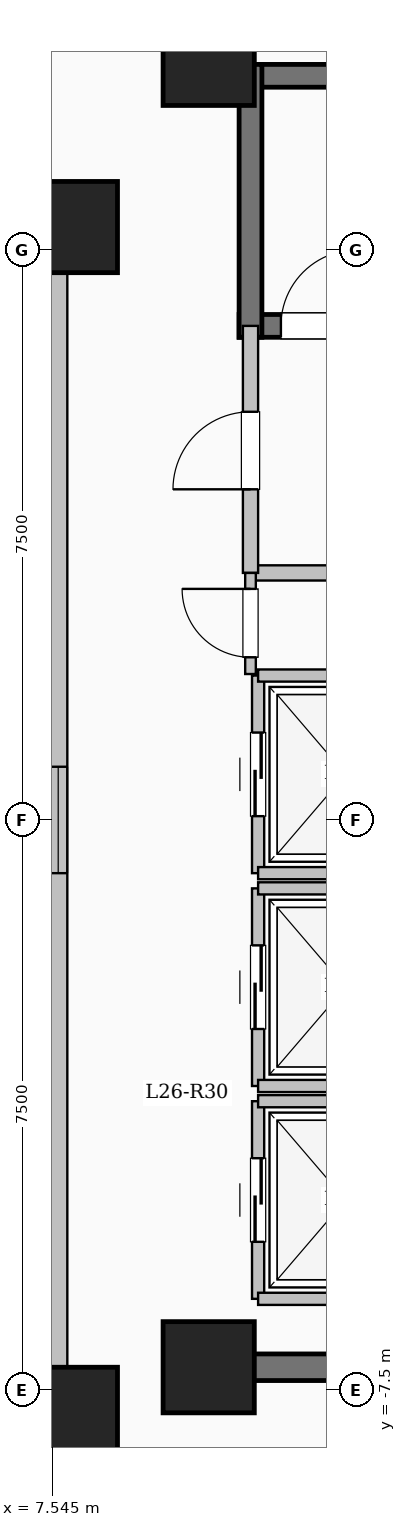
"""IFC4 building model, lengths in metres.
Left out: names, types, materials, properties, quantities, classifications, styles, units other than length and angle.
Written with IfcOpenShell. Run it as: python <this file> out.ifc"""

import sys

from ifc_helpers import new_model, si_unit, direction, frame, frame_2d, origin, origin_2d, place, context, subcontext, project, spatial, rectangle, extrude, element, fill, save


model = new_model("IFC4")
c1 = context("Model", 3, precision=1e-05, world=origin(), true_north=direction((0.0, 1.0)))
c2 = subcontext(c1, "Body", "Model", "MODEL_VIEW")
j1 = project(units=[si_unit("LENGTHUNIT", "METRE"), si_unit("PLANEANGLEUNIT", "RADIAN")], contexts=[c1])
p1 = place(None, origin())
s1 = spatial("IfcSite", under=j1, at=p1, CompositionType="ELEMENT")
p2 = place(p1, origin())
s2 = spatial("IfcBuilding", under=s1, at=p2, CompositionType="ELEMENT")
p3 = place(p2, frame((0.0, 0.0, 98.4)))
s3 = spatial("IfcBuildingStorey", under=s2, at=p3, CompositionType="ELEMENT", Elevation=98.4)
for number, where, z_axis, x_axis in (
    (1, (7.8, -7.8, 0.0), (0.0, 0.0, 1.0), (1.0, 0.0, 0.0)),
    (2, (7.8, 7.8, 0.0), (0.0, 0.0, 1.0), (1.0, 0.0, 0.0)),
    (3, (9.6, -7.2, 0.0), (0.0, 0.0, 1.0), (1.0, 0.0, 0.0)),
    (4, (9.6, 10.0, 0.0), (0.0, 0.0, 1.0), (1.0, 0.0, 0.0)),
):
    element("IfcColumn", number, at=place(p3, frame(where, z_axis=z_axis, x_axis=x_axis)), inside=s3, PredefinedType="COLUMN", context=c2, shape_type="SweptSolid", body=[
        extrude(rectangle(XDim=1.2, YDim=1.2, at=origin_2d()), origin(), (0.0, 0.0, 1.0), 3.35),
    ])
p4 = place(p3, frame((-7.62, -7.62, 0.0), z_axis=(0.0, 0.0, 1.0), x_axis=(1.0, 0.0, 0.0)))
e5 = element("IfcWall", 5, at=p4, inside=s3, PredefinedType="SOLIDWALL", context=c2, shape_type="SweptSolid", body=[
    extrude(rectangle(XDim=15.24, YDim=0.24, at=frame_2d((7.62, 0.0))), origin(), (0.0, 0.0, 1.0), 3.1),
])
p5 = place(p4, frame((6.92, 0.0, 0.95)))
e6 = element("IfcOpeningElement", 6, at=p5, cuts=e5, PredefinedType="OPENING", context=c2, shape_type="SweptSolid", body=[
    extrude(rectangle(XDim=1.4, YDim=1.5, at=frame_2d((0.7, 0.75))), frame((0.0, 0.13, 0.0), z_axis=(0.0, -1.0, 0.0), x_axis=(1.0, 0.0, 0.0)), (0.0, 0.0, 1.0), 0.26),
])
p6 = place(p3, frame((7.62, -7.62, 0.0), z_axis=(0.0, 0.0, 1.0), x_axis=(0.0, 1.0, 0.0)))
e7 = element("IfcWall", 7, at=p6, inside=s3, PredefinedType="SOLIDWALL", context=c2, shape_type="SweptSolid", body=[
    extrude(rectangle(XDim=15.24, YDim=0.24, at=frame_2d((7.62, 0.0))), origin(), (0.0, 0.0, 1.0), 3.1),
])
p7 = place(p6, frame((6.92, 0.0, 0.95)))
e8 = element("IfcOpeningElement", 8, at=p7, cuts=e7, PredefinedType="OPENING", context=c2, shape_type="SweptSolid", body=[
    extrude(rectangle(XDim=1.4, YDim=1.5, at=frame_2d((0.7, 0.75))), frame((0.0, 0.13, 0.0), z_axis=(0.0, -1.0, 0.0), x_axis=(1.0, 0.0, 0.0)), (0.0, 0.0, 1.0), 0.26),
])
p8 = place(p3, frame((7.62, 7.62, 0.0), z_axis=(0.0, 0.0, 1.0), x_axis=(-1.0, 0.0, 0.0)))
e9 = element("IfcWall", 9, at=p8, inside=s3, PredefinedType="SOLIDWALL", context=c2, shape_type="SweptSolid", body=[
    extrude(rectangle(XDim=15.24, YDim=0.24, at=frame_2d((7.62, 0.0))), origin(), (0.0, 0.0, 1.0), 3.1),
])
p9 = place(p8, frame((6.92, 0.0, 0.95)))
e10 = element("IfcOpeningElement", 10, at=p9, cuts=e9, PredefinedType="OPENING", context=c2, shape_type="SweptSolid", body=[
    extrude(rectangle(XDim=1.4, YDim=1.5, at=frame_2d((0.7, 0.75))), frame((0.0, 0.13, 0.0), z_axis=(0.0, -1.0, 0.0), x_axis=(1.0, 0.0, 0.0)), (0.0, 0.0, 1.0), 0.26),
])
p10 = place(p3, frame((10.0, 9.79, 0.0), z_axis=(0.0, 0.0, 1.0), x_axis=(1.0, 0.0, 0.0)))
e11 = element("IfcWall", 11, at=p10, inside=s3, PredefinedType="SHEAR", context=c2, shape_type="SweptSolid", body=[
    extrude(rectangle(XDim=8.0, YDim=0.3, at=frame_2d((4.0, 0.0))), origin(), (0.0, 0.0, 1.0), 3.35),
])
p11 = place(p3, frame((10.0, 6.5, 0.0), z_axis=(0.0, 0.0, 1.0), x_axis=(1.0, 0.0, 0.0)))
e12 = element("IfcWall", 12, at=p11, inside=s3, PredefinedType="SHEAR", context=c2, shape_type="SweptSolid", body=[
    extrude(rectangle(XDim=8.0, YDim=0.3, at=frame_2d((4.0, 0.0))), origin(), (0.0, 0.0, 1.0), 3.35),
])
p12 = place(p11, frame((0.55, 0.0, 0.0)))
e13 = element("IfcOpeningElement", 13, at=p12, cuts=e12, PredefinedType="OPENING", context=c2, shape_type="SweptSolid", body=[
    extrude(rectangle(XDim=1.0, YDim=2.15, at=frame_2d((0.5, 1.075))), frame((0.0, 0.16, 0.0), z_axis=(0.0, -1.0, 0.0), x_axis=(1.0, 0.0, 0.0)), (0.0, 0.0, 1.0), 0.32),
])
p13 = place(p3, frame((10.15, 6.35, 0.0), z_axis=(0.0, 0.0, 1.0), x_axis=(0.0, 1.0, 0.0)))
e14 = element("IfcWall", 14, at=p13, inside=s3, PredefinedType="SHEAR", context=c2, shape_type="SweptSolid", body=[
    extrude(rectangle(XDim=3.59, YDim=0.3, at=frame_2d((1.795, 0.0))), origin(), (0.0, 0.0, 1.0), 3.35),
])
p14 = place(p3, frame((10.15, 3.25, 0.0), z_axis=(0.0, 0.0, 1.0), x_axis=(1.0, 0.0, 0.0)))
e15 = element("IfcWall", 15, at=p14, inside=s3, PredefinedType="SOLIDWALL", context=c2, shape_type="SweptSolid", body=[
    extrude(rectangle(XDim=5.4, YDim=0.2, at=frame_2d((2.7, 0.0))), origin(), (0.0, 0.0, 1.0), 3.1),
])
p15 = place(p3, frame((10.15, 3.25, 0.0), z_axis=(0.0, 0.0, 1.0), x_axis=(0.0, 1.0, 0.0)))
e16 = element("IfcWall", 16, at=p15, inside=s3, PredefinedType="SOLIDWALL", context=c2, shape_type="SweptSolid", body=[
    extrude(rectangle(XDim=3.25, YDim=0.2, at=frame_2d((1.625, 0.0))), origin(), (0.0, 0.0, 1.0), 3.1),
])
p16 = place(p15, frame((1.1, 0.0, 0.0)))
e17 = element("IfcOpeningElement", 17, at=p16, cuts=e16, PredefinedType="OPENING", context=c2, shape_type="SweptSolid", body=[
    extrude(rectangle(XDim=1.02, YDim=2.15, at=frame_2d((0.51, 1.075))), frame((0.0, 0.11, 0.0), z_axis=(0.0, -1.0, 0.0), x_axis=(1.0, 0.0, 0.0)), (0.0, 0.0, 1.0), 0.22),
])
p17 = place(p3, frame((10.25, -6.3, 0.0), z_axis=(0.0, 0.0, 1.0), x_axis=(0.0, 1.0, 0.0)))
e18 = element("IfcWall", 18, at=p17, inside=s3, PredefinedType="SOLIDWALL", context=c2, shape_type="SweptSolid", body=[
    extrude(rectangle(XDim=2.6, YDim=0.16, at=frame_2d((1.3, 0.0))), origin(), (0.0, 0.0, 1.0), 3.1),
])
p18 = place(p17, frame((0.75, 0.0, 0.0)))
e19 = element("IfcOpeningElement", 19, at=p18, cuts=e18, PredefinedType="OPENING", context=c2, shape_type="SweptSolid", body=[
    extrude(rectangle(XDim=1.1, YDim=2.15, at=frame_2d((0.55, 1.075))), frame((0.0, 0.09, 0.0), z_axis=(0.0, -1.0, 0.0), x_axis=(1.0, 0.0, 0.0)), (0.0, 0.0, 1.0), 0.18),
])
for number, where, z_axis, x_axis in (
    (20, (10.25, -6.3, 0.0), (0.0, 0.0, 1.0), (1.0, 0.0, 0.0)),
    (21, (10.25, -3.7, 0.0), (0.0, 0.0, 1.0), (1.0, 0.0, 0.0)),
):
    element("IfcWall", number, at=place(p3, frame(where, z_axis=z_axis, x_axis=x_axis)), inside=s3, PredefinedType="SOLIDWALL", context=c2, shape_type="SweptSolid", body=[
        extrude(rectangle(XDim=2.3, YDim=0.16, at=frame_2d((1.15, 0.0))), origin(), (0.0, 0.0, 1.0), 3.1),
    ])
p19 = place(p3, frame((10.25, -3.5, 0.0), z_axis=(0.0, 0.0, 1.0), x_axis=(0.0, 1.0, 0.0)))
e22 = element("IfcWall", 22, at=p19, inside=s3, PredefinedType="SOLIDWALL", context=c2, shape_type="SweptSolid", body=[
    extrude(rectangle(XDim=2.6, YDim=0.16, at=frame_2d((1.3, 0.0))), origin(), (0.0, 0.0, 1.0), 3.1),
])
p20 = place(p19, frame((0.75, 0.0, 0.0)))
e23 = element("IfcOpeningElement", 23, at=p20, cuts=e22, PredefinedType="OPENING", context=c2, shape_type="SweptSolid", body=[
    extrude(rectangle(XDim=1.1, YDim=2.15, at=frame_2d((0.55, 1.075))), frame((0.0, 0.09, 0.0), z_axis=(0.0, -1.0, 0.0), x_axis=(1.0, 0.0, 0.0)), (0.0, 0.0, 1.0), 0.18),
])
for number, where, z_axis, x_axis in (
    (24, (10.25, -3.5, 0.0), (0.0, 0.0, 1.0), (1.0, 0.0, 0.0)),
    (25, (10.25, -0.9, 0.0), (0.0, 0.0, 1.0), (1.0, 0.0, 0.0)),
):
    element("IfcWall", number, at=place(p3, frame(where, z_axis=z_axis, x_axis=x_axis)), inside=s3, PredefinedType="SOLIDWALL", context=c2, shape_type="SweptSolid", body=[
        extrude(rectangle(XDim=2.3, YDim=0.16, at=frame_2d((1.15, 0.0))), origin(), (0.0, 0.0, 1.0), 3.1),
    ])
p21 = place(p3, frame((10.25, -0.7, 0.0), z_axis=(0.0, 0.0, 1.0), x_axis=(0.0, 1.0, 0.0)))
e26 = element("IfcWall", 26, at=p21, inside=s3, PredefinedType="SOLIDWALL", context=c2, shape_type="SweptSolid", body=[
    extrude(rectangle(XDim=2.6, YDim=0.16, at=frame_2d((1.3, 0.0))), origin(), (0.0, 0.0, 1.0), 3.1),
])
p22 = place(p21, frame((0.75, 0.0, 0.0)))
e27 = element("IfcOpeningElement", 27, at=p22, cuts=e26, PredefinedType="OPENING", context=c2, shape_type="SweptSolid", body=[
    extrude(rectangle(XDim=1.1, YDim=2.15, at=frame_2d((0.55, 1.075))), frame((0.0, 0.09, 0.0), z_axis=(0.0, -1.0, 0.0), x_axis=(1.0, 0.0, 0.0)), (0.0, 0.0, 1.0), 0.18),
])
for number, where, z_axis, x_axis in (
    (28, (10.25, -0.7, 0.0), (0.0, 0.0, 1.0), (1.0, 0.0, 0.0)),
    (29, (10.25, 1.9, 0.0), (0.0, 0.0, 1.0), (1.0, 0.0, 0.0)),
):
    element("IfcWall", number, at=place(p3, frame(where, z_axis=z_axis, x_axis=x_axis)), inside=s3, PredefinedType="SOLIDWALL", context=c2, shape_type="SweptSolid", body=[
        extrude(rectangle(XDim=2.3, YDim=0.16, at=frame_2d((1.15, 0.0))), origin(), (0.0, 0.0, 1.0), 3.1),
    ])
p23 = place(p3, frame((10.075, -7.2, 0.0), z_axis=(0.0, 0.0, 1.0), x_axis=(1.0, 0.0, 0.0)))
e30 = element("IfcWall", 30, at=p23, inside=s3, PredefinedType="SHEAR", context=c2, shape_type="SweptSolid", body=[
    extrude(rectangle(XDim=8.55, YDim=0.35, at=frame_2d((4.275, 0.0))), origin(), (0.0, 0.0, 1.0), 3.35),
])
p24 = place(p3, frame((10.15, 1.92, 0.0), z_axis=(0.0, 0.0, 1.0), x_axis=(0.0, 1.0, 0.0)))
e31 = element("IfcWall", 31, at=p24, inside=s3, PredefinedType="PARTITIONING", context=c2, shape_type="SweptSolid", body=[
    extrude(rectangle(XDim=1.33, YDim=0.14, at=frame_2d((0.665, 0.0))), origin(), (0.0, 0.0, 1.0), 3.1),
])
p25 = place(p24, frame((0.22, 0.0, 0.0)))
e32 = element("IfcOpeningElement", 32, at=p25, cuts=e31, PredefinedType="OPENING", context=c2, shape_type="SweptSolid", body=[
    extrude(rectangle(XDim=0.9, YDim=2.08, at=frame_2d((0.45, 1.04))), frame((0.0, 0.08, 0.0), z_axis=(0.0, -1.0, 0.0), x_axis=(1.0, 0.0, 0.0)), (0.0, 0.0, 1.0), 0.16),
])
p26 = place(p7, origin())
e33 = element("IfcWindow", 33, at=p26, inside=s3, PartitioningType="SINGLE_PANEL", PredefinedType="WINDOW", context=c2, shape_type="SweptSolid", body=[
    extrude(rectangle(XDim=1.4, YDim=1.5, at=frame_2d((0.7, 0.75))), frame((0.0, 0.03, 0.0), z_axis=(0.0, -1.0, 0.0), x_axis=(1.0, 0.0, 0.0)), (0.0, 0.0, 1.0), 0.06),
])
fill(e8, e33)
p27 = place(p12, origin())
e34 = element("IfcDoor", 34, at=p27, inside=s3, OperationType="SINGLE_SWING_RIGHT", PredefinedType="DOOR", context=c2, shape_type="SweptSolid", body=[
    extrude(rectangle(XDim=1.0, YDim=2.15, at=frame_2d((0.5, 1.075))), frame((0.0, 0.025, 0.0), z_axis=(0.0, -1.0, 0.0), x_axis=(1.0, 0.0, 0.0)), (0.0, 0.0, 1.0), 0.05),
])
fill(e13, e34)
p28 = place(p16, origin())
e35 = element("IfcDoor", 35, at=p28, inside=s3, OperationType="SINGLE_SWING_LEFT", PredefinedType="DOOR", context=c2, shape_type="SweptSolid", body=[
    extrude(rectangle(XDim=1.02, YDim=2.15, at=frame_2d((0.51, 1.075))), frame((0.0, 0.025, 0.0), z_axis=(0.0, -1.0, 0.0), x_axis=(1.0, 0.0, 0.0)), (0.0, 0.0, 1.0), 0.05),
])
fill(e17, e35)
p29 = place(p18, origin())
e36 = element("IfcDoor", 36, at=p29, inside=s3, OperationType="SLIDING_TO_LEFT", PredefinedType="DOOR", context=c2, shape_type="SweptSolid", body=[
    extrude(rectangle(XDim=1.1, YDim=2.15, at=frame_2d((0.55, 1.075))), frame((0.0, 0.025, 0.0), z_axis=(0.0, -1.0, 0.0), x_axis=(1.0, 0.0, 0.0)), (0.0, 0.0, 1.0), 0.05),
])
fill(e19, e36)
p30 = place(p20, origin())
e37 = element("IfcDoor", 37, at=p30, inside=s3, OperationType="SLIDING_TO_LEFT", PredefinedType="DOOR", context=c2, shape_type="SweptSolid", body=[
    extrude(rectangle(XDim=1.1, YDim=2.15, at=frame_2d((0.55, 1.075))), frame((0.0, 0.025, 0.0), z_axis=(0.0, -1.0, 0.0), x_axis=(1.0, 0.0, 0.0)), (0.0, 0.0, 1.0), 0.05),
])
fill(e23, e37)
p31 = place(p22, origin())
e38 = element("IfcDoor", 38, at=p31, inside=s3, OperationType="SLIDING_TO_LEFT", PredefinedType="DOOR", context=c2, shape_type="SweptSolid", body=[
    extrude(rectangle(XDim=1.1, YDim=2.15, at=frame_2d((0.55, 1.075))), frame((0.0, 0.025, 0.0), z_axis=(0.0, -1.0, 0.0), x_axis=(1.0, 0.0, 0.0)), (0.0, 0.0, 1.0), 0.05),
])
fill(e27, e38)
p32 = place(p25, origin())
e39 = element("IfcDoor", 39, at=p32, inside=s3, OperationType="SINGLE_SWING_RIGHT", PredefinedType="DOOR", context=c2, shape_type="SweptSolid", body=[
    extrude(rectangle(XDim=0.9, YDim=2.08, at=frame_2d((0.45, 1.04))), frame((0.0, 0.025, 0.0), z_axis=(0.0, -1.0, 0.0), x_axis=(1.0, 0.0, 0.0)), (0.0, 0.0, 1.0), 0.05),
])
fill(e32, e39)
save(model, sys.argv[1])
